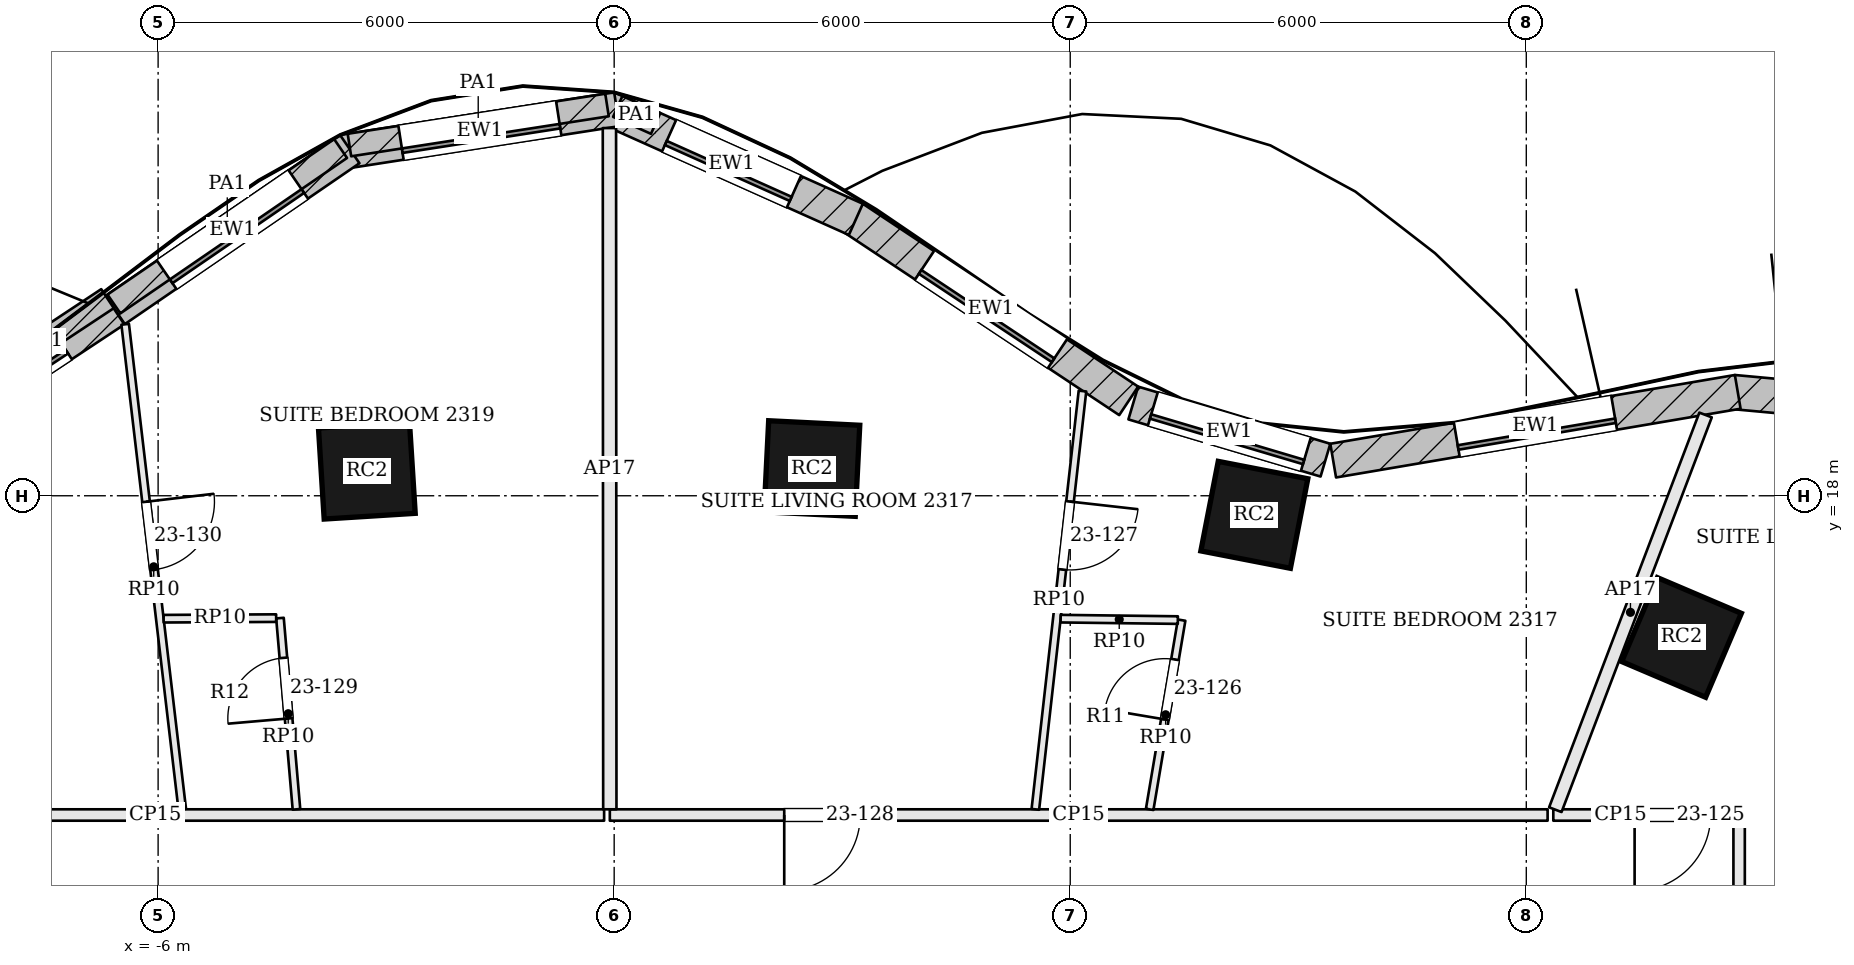
"""IFC4 building model, lengths in metres.
Left out: names, types, materials, properties, quantities, classifications, styles, units other than length and angle.
Written with IfcOpenShell. Run it as: python <this file> out.ifc"""

import sys

from ifc_helpers import new_model, si_unit, direction, frame, frame_2d, origin, origin_2d, place, context, subcontext, project, spatial, rectangle, extrude, element, fill, save


model = new_model("IFC4")
c1 = context("Model", 3, precision=1e-05, world=origin(), true_north=direction((0.0, 1.0)))
c2 = subcontext(c1, "Body", "Model", "MODEL_VIEW")
j1 = project(units=[si_unit("LENGTHUNIT", "METRE"), si_unit("PLANEANGLEUNIT", "RADIAN")], contexts=[c1])
p1 = place(None, origin())
s1 = spatial("IfcSite", under=j1, at=p1, CompositionType="ELEMENT")
p2 = place(p1, origin())
s2 = spatial("IfcBuilding", under=s1, at=p2, CompositionType="ELEMENT")
p3 = place(p2, frame((0.0, 0.0, 99.6)))
s3 = spatial("IfcBuildingStorey", under=s2, at=p3, CompositionType="ELEMENT", Elevation=99.6)
for number, where, z_axis, x_axis in (
    (1, (14.042, 16.136, 0.0), (0.0, 0.0, 1.0), (-0.92, 0.392, 0.0)),
    (2, (8.422, 17.749, 0.0), (0.0, 0.0, 1.0), (-0.982, 0.191, 0.0)),
    (3, (2.602, 18.358, 0.0), (0.0, 0.0, 1.0), (-0.999, 0.05, 0.0)),
    (4, (-3.254, 18.33, 0.0), (0.0, 0.0, 1.0), (-0.998, -0.063, 0.0)),
):
    element("IfcColumn", number, at=place(p3, frame(where, z_axis=z_axis, x_axis=x_axis)), inside=s3, PredefinedType="COLUMN", context=c2, shape_type="SweptSolid", body=[
        extrude(rectangle(XDim=1.2, YDim=1.2, at=origin_2d()), origin(), (0.0, 0.0, 1.0), 3.6),
    ])
p4 = place(p3, frame((19.159, 18.956, 0.0), z_axis=(0.0, 0.0, 1.0), x_axis=(-0.995777399421, 0.091800712424, 0.0)))
e5 = element("IfcWall", 5, at=p4, inside=s3, PredefinedType="SOLIDWALL", context=c2, shape_type="SweptSolid", body=[
    extrude(rectangle(XDim=4.455, YDim=0.45, at=frame_2d((2.227, 0.0))), origin(), (0.0, 0.0, 1.0), 3.4),
])
p5 = place(p4, frame((1.177, 0.0, 0.9)))
e6 = element("IfcOpeningElement", 6, at=p5, cuts=e5, PredefinedType="OPENING", context=c2, shape_type="SweptSolid", body=[
    extrude(rectangle(XDim=2.1, YDim=2.0, at=frame_2d((1.05, 1.0))), frame((0.0, 0.235, 0.0), z_axis=(0.0, -1.0, 0.0), x_axis=(1.0, 0.0, 0.0)), (0.0, 0.0, 1.0), 0.47),
])
p6 = place(p3, frame((14.782, 19.367, 0.0), z_axis=(0.0, 0.0, 1.0), x_axis=(-0.98585584667, -0.167595493934, 0.0)))
e7 = element("IfcWall", 7, at=p6, inside=s3, PredefinedType="SOLIDWALL", context=c2, shape_type="SweptSolid", body=[
    extrude(rectangle(XDim=5.399, YDim=0.45, at=frame_2d((2.699, 0.0))), origin(), (0.0, 0.0, 1.0), 3.4),
])
p7 = place(p6, frame((1.649, 0.0, 0.9)))
e8 = element("IfcOpeningElement", 8, at=p7, cuts=e7, PredefinedType="OPENING", context=c2, shape_type="SweptSolid", body=[
    extrude(rectangle(XDim=2.1, YDim=2.0, at=frame_2d((1.05, 1.0))), frame((0.0, 0.235, 0.0), z_axis=(0.0, -1.0, 0.0), x_axis=(1.0, 0.0, 0.0)), (0.0, 0.0, 1.0), 0.47),
])
p8 = place(p3, frame((9.357, 18.469, 0.0), z_axis=(0.0, 0.0, 1.0), x_axis=(-0.958524054629, 0.285011643091, 0.0)))
e9 = element("IfcWall", 9, at=p8, inside=s3, PredefinedType="SOLIDWALL", context=c2, shape_type="SweptSolid", body=[
    extrude(rectangle(XDim=2.637, YDim=0.45, at=frame_2d((1.319, 0.0))), origin(), (0.0, 0.0, 1.0), 3.4),
])
p9 = place(p8, frame((0.269, 0.0, 0.9)))
e10 = element("IfcOpeningElement", 10, at=p9, cuts=e9, PredefinedType="OPENING", context=c2, shape_type="SweptSolid", body=[
    extrude(rectangle(XDim=2.1, YDim=2.0, at=frame_2d((1.05, 1.0))), frame((0.0, 0.235, 0.0), z_axis=(0.0, -1.0, 0.0), x_axis=(1.0, 0.0, 0.0)), (0.0, 0.0, 1.0), 0.47),
])
p10 = place(p3, frame((6.769, 19.248, 0.0), z_axis=(0.0, 0.0, 1.0), x_axis=(-0.832973379274, 0.553313066375, 0.0)))
e11 = element("IfcWall", 11, at=p10, inside=s3, PredefinedType="SOLIDWALL", context=c2, shape_type="SweptSolid", body=[
    extrude(rectangle(XDim=4.348, YDim=0.45, at=frame_2d((2.174, 0.0))), origin(), (0.0, 0.0, 1.0), 3.4),
])
p11 = place(p10, frame((1.124, 0.0, 0.9)))
e12 = element("IfcOpeningElement", 12, at=p11, cuts=e11, PredefinedType="OPENING", context=c2, shape_type="SweptSolid", body=[
    extrude(rectangle(XDim=2.1, YDim=2.0, at=frame_2d((1.05, 1.0))), frame((0.0, 0.235, 0.0), z_axis=(0.0, -1.0, 0.0), x_axis=(1.0, 0.0, 0.0)), (0.0, 0.0, 1.0), 0.47),
])
p12 = place(p3, frame((3.179, 21.636, 0.0), z_axis=(0.0, 0.0, 1.0), x_axis=(-0.912608353595, 0.40883492139, 0.0)))
e13 = element("IfcWall", 13, at=p12, inside=s3, PredefinedType="SOLIDWALL", context=c2, shape_type="SweptSolid", body=[
    extrude(rectangle(XDim=3.585, YDim=0.45, at=frame_2d((1.792, 0.0))), origin(), (0.0, 0.0, 1.0), 3.4),
])
p13 = place(p12, frame((0.892, 0.0, 0.9)))
e14 = element("IfcOpeningElement", 14, at=p13, cuts=e13, PredefinedType="OPENING", context=c2, shape_type="SweptSolid", body=[
    extrude(rectangle(XDim=1.8, YDim=2.0, at=frame_2d((0.9, 1.0))), frame((0.0, 0.235, 0.0), z_axis=(0.0, -1.0, 0.0), x_axis=(1.0, 0.0, 0.0)), (0.0, 0.0, 1.0), 0.47),
])
p14 = place(p3, frame((0.035, 23.085, 0.0), z_axis=(0.0, 0.0, 1.0), x_axis=(-0.988133637562, -0.153596596054, 0.0)))
e15 = element("IfcWall", 15, at=p14, inside=s3, PredefinedType="SOLIDWALL", context=c2, shape_type="SweptSolid", body=[
    extrude(rectangle(XDim=3.646, YDim=0.45, at=frame_2d((1.823, 0.0))), origin(), (0.0, 0.0, 1.0), 3.4),
])
p15 = place(p14, frame((0.773, 0.0, 0.9)))
e16 = element("IfcOpeningElement", 16, at=p15, cuts=e15, PredefinedType="OPENING", context=c2, shape_type="SweptSolid", body=[
    extrude(rectangle(XDim=2.1, YDim=2.0, at=frame_2d((1.05, 1.0))), frame((0.0, 0.235, 0.0), z_axis=(0.0, -1.0, 0.0), x_axis=(1.0, 0.0, 0.0)), (0.0, 0.0, 1.0), 0.47),
])
p16 = place(p3, frame((-3.479, 22.56, 0.0), z_axis=(0.0, 0.0, 1.0), x_axis=(-0.824722766417, -0.565537230033, 0.0)))
e17 = element("IfcWall", 17, at=p16, inside=s3, PredefinedType="SOLIDWALL", context=c2, shape_type="SweptSolid", body=[
    extrude(rectangle(XDim=3.742, YDim=0.45, at=frame_2d((1.871, 0.0))), origin(), (0.0, 0.0, 1.0), 3.4),
])
p17 = place(p16, frame((0.821, 0.0, 0.9)))
e18 = element("IfcOpeningElement", 18, at=p17, cuts=e17, PredefinedType="OPENING", context=c2, shape_type="SweptSolid", body=[
    extrude(rectangle(XDim=2.1, YDim=2.0, at=frame_2d((1.05, 1.0))), frame((0.0, 0.235, 0.0), z_axis=(0.0, -1.0, 0.0), x_axis=(1.0, 0.0, 0.0)), (0.0, 0.0, 1.0), 0.47),
])
p18 = place(p3, frame((-6.568, 20.441, 0.0), z_axis=(0.0, 0.0, 1.0), x_axis=(-0.834034214531, -0.551712723246, 0.0)))
e19 = element("IfcWall", 19, at=p18, inside=s3, PredefinedType="SOLIDWALL", context=c2, shape_type="SweptSolid", body=[
    extrude(rectangle(XDim=3.757, YDim=0.45, at=frame_2d((1.879, 0.0))), origin(), (0.0, 0.0, 1.0), 3.4),
])
p19 = place(p18, frame((0.829, 0.0, 0.9)))
e20 = element("IfcOpeningElement", 20, at=p19, cuts=e19, PredefinedType="OPENING", context=c2, shape_type="SweptSolid", body=[
    extrude(rectangle(XDim=2.1, YDim=2.0, at=frame_2d((1.05, 1.0))), frame((0.0, 0.235, 0.0), z_axis=(0.0, -1.0, 0.0), x_axis=(1.0, 0.0, 0.0)), (0.0, 0.0, 1.0), 0.47),
])
p20 = place(p3, frame((0.545, 22.898, 3.6), z_axis=(0.0, 0.0, 1.0), x_axis=(-0.912497815069, 0.409081578044, 0.0)))
e21 = element("IfcWall", 21, at=p20, inside=s3, PredefinedType="PARAPET", context=c2, shape_type="SweptSolid", body=[
    extrude(rectangle(XDim=0.546, YDim=0.3, at=frame_2d((0.273, 0.0))), origin(), (0.0, 0.0, 1.0), 1.1),
])
p21 = place(p3, frame((-0.094, 23.14, 3.6), z_axis=(0.0, 0.0, 1.0), x_axis=(-0.988150084887, -0.153490748056, 0.0)))
e22 = element("IfcWall", 22, at=p21, inside=s3, PredefinedType="PARAPET", context=c2, shape_type="SweptSolid", body=[
    extrude(rectangle(XDim=3.429, YDim=0.3, at=frame_2d((1.715, 0.0))), origin(), (0.0, 0.0, 1.0), 1.1),
])
p22 = place(p3, frame((-3.599, 22.568, 3.6), z_axis=(0.0, 0.0, 1.0), x_axis=(-0.82476034254, -0.565482428881, 0.0)))
e23 = element("IfcWall", 23, at=p22, inside=s3, PredefinedType="PARAPET", context=c2, shape_type="SweptSolid", body=[
    extrude(rectangle(XDim=3.616, YDim=0.3, at=frame_2d((1.808, 0.0))), origin(), (0.0, 0.0, 1.0), 1.1),
])
p23 = place(p3, frame((-6.665, 20.593, 3.6), z_axis=(0.0, 0.0, 1.0), x_axis=(-0.834027642059, -0.551722658843, 0.0)))
e24 = element("IfcWall", 24, at=p23, inside=s3, PredefinedType="PARAPET", context=c2, shape_type="SweptSolid", body=[
    extrude(rectangle(XDim=2.008, YDim=0.3, at=frame_2d((1.004, 0.0))), origin(), (0.0, 0.0, 1.0), 1.1),
])
p24 = place(p3, frame((14.8, 10.572, 0.0), z_axis=(0.0, 0.0, 1.0), x_axis=(0.0, 1.0, 0.0)))
e25 = element("IfcWall", 25, at=p24, inside=s3, PredefinedType="PARTITIONING", context=c2, shape_type="SweptSolid", body=[
    extrude(rectangle(XDim=3.228, YDim=0.15, at=frame_2d((1.614, 0.0))), origin(), (0.0, 0.0, 1.0), 2.784),
])
p25 = place(p3, frame((14.725, 13.8, 0.0), z_axis=(0.0, 0.0, 1.0), x_axis=(-1.0, 0.0, 0.0)))
e26 = element("IfcWall", 26, at=p25, inside=s3, PredefinedType="PARTITIONING", context=c2, shape_type="SweptSolid", body=[
    extrude(rectangle(XDim=2.37, YDim=0.15, at=frame_2d((1.185, 0.0))), origin(), (0.0, 0.0, 1.0), 2.784),
])
p26 = place(p25, frame((0.3, 0.0, 0.0)))
e27 = element("IfcOpeningElement", 27, at=p26, cuts=e26, PredefinedType="OPENING", context=c2, shape_type="SweptSolid", body=[
    extrude(rectangle(XDim=1.0, YDim=2.1, at=frame_2d((0.5, 1.05))), frame((0.0, 0.085, 0.0), z_axis=(0.0, -1.0, 0.0), x_axis=(1.0, 0.0, 0.0)), (0.0, 0.0, 1.0), 0.17),
])
p27 = place(p3, frame((14.359, 19.063, 0.0), z_axis=(0.0, 0.0, 1.0), x_axis=(-0.355746808742, -0.934582370939, 0.0)))
e28 = element("IfcWall", 28, at=p27, inside=s3, PredefinedType="PARTITIONING", context=c2, shape_type="SweptSolid", body=[
    extrude(rectangle(XDim=5.556, YDim=0.175, at=frame_2d((2.778, 0.0))), origin(), (0.0, 0.0, 1.0), 2.784),
])
p28 = place(p3, frame((12.281, 13.8, 0.0), z_axis=(0.0, 0.0, 1.0), x_axis=(-1.0, 0.0, 0.0)))
e29 = element("IfcWall", 29, at=p28, inside=s3, PredefinedType="PARTITIONING", context=c2, shape_type="SweptSolid", body=[
    extrude(rectangle(XDim=12.338, YDim=0.15, at=frame_2d((6.169, 0.0))), origin(), (0.0, 0.0, 1.0), 2.784),
])
p29 = place(p28, frame((9.043, 0.0, 0.0)))
e30 = element("IfcOpeningElement", 30, at=p29, cuts=e29, PredefinedType="OPENING", context=c2, shape_type="SweptSolid", body=[
    extrude(rectangle(XDim=1.0, YDim=2.1, at=frame_2d((0.5, 1.05))), frame((0.0, 0.085, 0.0), z_axis=(0.0, -1.0, 0.0), x_axis=(1.0, 0.0, 0.0)), (0.0, 0.0, 1.0), 0.17),
])
p30 = place(p3, frame((-0.062, 22.837, 0.0), z_axis=(0.0, 0.0, 1.0), x_axis=(0.000599291639, -0.999999820425, 0.0)))
e31 = element("IfcWall", 31, at=p30, inside=s3, PredefinedType="PARTITIONING", context=c2, shape_type="SweptSolid", body=[
    extrude(rectangle(XDim=8.962, YDim=0.175, at=frame_2d((4.481, 0.0))), origin(), (0.0, 0.0, 1.0), 2.784),
])
p31 = place(p3, frame((-0.132, 13.8, 0.0), z_axis=(0.0, 0.0, 1.0), x_axis=(-1.0, 0.0, 0.0)))
e32 = element("IfcWall", 32, at=p31, inside=s3, PredefinedType="PARTITIONING", context=c2, shape_type="SweptSolid", body=[
    extrude(rectangle(XDim=11.81, YDim=0.15, at=frame_2d((5.905, 0.0))), origin(), (0.0, 0.0, 1.0), 2.784),
])
p32 = place(p31, frame((8.213, 0.0, 0.0)))
e33 = element("IfcOpeningElement", 33, at=p32, cuts=e32, PredefinedType="OPENING", context=c2, shape_type="SweptSolid", body=[
    extrude(rectangle(XDim=1.0, YDim=2.1, at=frame_2d((0.5, 1.05))), frame((0.0, 0.085, 0.0), z_axis=(0.0, -1.0, 0.0), x_axis=(1.0, 0.0, 0.0)), (0.0, 0.0, 1.0), 0.17),
])
p33 = place(p3, frame((18.949, 18.745, 0.0), z_axis=(0.0, 0.0, 1.0), x_axis=(-0.505754187447, -0.862677634972, 0.0)))
e34 = element("IfcWall", 34, at=p33, inside=s3, PredefinedType="PARTITIONING", context=c2, shape_type="SweptSolid", body=[
    extrude(rectangle(XDim=8.128, YDim=0.1, at=frame_2d((4.064, 0.0))), origin(), (0.0, 0.0, 1.0), 2.784),
])
p34 = place(p33, frame((4.053, 0.0, 0.0)))
e35 = element("IfcOpeningElement", 35, at=p34, cuts=e34, PredefinedType="OPENING", context=c2, shape_type="SweptSolid", body=[
    extrude(rectangle(XDim=0.9, YDim=2.4, at=frame_2d((0.45, 1.2))), frame((0.0, 0.06, 0.0), z_axis=(0.0, -1.0, 0.0), x_axis=(1.0, 0.0, 0.0)), (0.0, 0.0, 1.0), 0.12),
])
p35 = place(p3, frame((6.161, 19.377, 0.0), z_axis=(0.0, 0.0, 1.0), x_axis=(-0.11193626313, -0.993715388326, 0.0)))
e36 = element("IfcWall", 36, at=p35, inside=s3, PredefinedType="PARTITIONING", context=c2, shape_type="SweptSolid", body=[
    extrude(rectangle(XDim=5.538, YDim=0.1, at=frame_2d((2.769, 0.0))), origin(), (0.0, 0.0, 1.0), 2.784),
])
p36 = place(p35, frame((1.463, 0.0, 0.0)))
e37 = element("IfcOpeningElement", 37, at=p36, cuts=e36, PredefinedType="OPENING", context=c2, shape_type="SweptSolid", body=[
    extrude(rectangle(XDim=0.9, YDim=2.4, at=frame_2d((0.45, 1.2))), frame((0.0, 0.06, 0.0), z_axis=(0.0, -1.0, 0.0), x_axis=(1.0, 0.0, 0.0)), (0.0, 0.0, 1.0), 0.12),
])
p37 = place(p3, frame((7.045, 13.874, 0.0), z_axis=(0.0, 0.0, 1.0), x_axis=(0.166499655313, 0.986041512707, 0.0)))
e38 = element("IfcWall", 38, at=p37, inside=s3, PredefinedType="PARTITIONING", context=c2, shape_type="SweptSolid", body=[
    extrude(rectangle(XDim=2.525, YDim=0.1, at=frame_2d((1.262, 0.0))), origin(), (0.0, 0.0, 1.0), 2.784),
])
p38 = place(p37, frame((1.2, 0.0, 0.0)))
e39 = element("IfcOpeningElement", 39, at=p38, cuts=e38, PredefinedType="OPENING", context=c2, shape_type="SweptSolid", body=[
    extrude(rectangle(XDim=0.8, YDim=2.1, at=frame_2d((0.4, 1.05))), frame((0.0, 0.06, 0.0), z_axis=(0.0, -1.0, 0.0), x_axis=(1.0, 0.0, 0.0)), (0.0, 0.0, 1.0), 0.12),
])
p39 = place(p3, frame((7.416, 16.364, 0.0), z_axis=(0.0, 0.0, 1.0), x_axis=(-0.999925671337, 0.012192284512, 0.0)))
e40 = element("IfcWall", 40, at=p39, inside=s3, PredefinedType="PARTITIONING", context=c2, shape_type="SweptSolid", body=[
    extrude(rectangle(XDim=1.542, YDim=0.1, at=frame_2d((0.771, 0.0))), origin(), (0.0, 0.0, 1.0), 2.784),
])
p40 = place(p3, frame((-6.433, 20.256, 0.0), z_axis=(0.0, 0.0, 1.0), x_axis=(0.116872110209, -0.993146972938, 0.0)))
e41 = element("IfcWall", 41, at=p40, inside=s3, PredefinedType="PARTITIONING", context=c2, shape_type="SweptSolid", body=[
    extrude(rectangle(XDim=6.426, YDim=0.1, at=frame_2d((3.213, 0.0))), origin(), (0.0, 0.0, 1.0), 2.784),
])
p41 = place(p40, frame((2.351, 0.0, 0.0)))
e42 = element("IfcOpeningElement", 42, at=p41, cuts=e41, PredefinedType="OPENING", context=c2, shape_type="SweptSolid", body=[
    extrude(rectangle(XDim=0.9, YDim=2.4, at=frame_2d((0.45, 1.2))), frame((0.0, 0.06, 0.0), z_axis=(0.0, -1.0, 0.0), x_axis=(1.0, 0.0, 0.0)), (0.0, 0.0, 1.0), 0.12),
])
p42 = place(p3, frame((-4.18, 13.875, 0.0), z_axis=(0.0, 0.0, 1.0), x_axis=(-0.085957842689, 0.996298775107, 0.0)))
e43 = element("IfcWall", 43, at=p42, inside=s3, PredefinedType="PARTITIONING", context=c2, shape_type="SweptSolid", body=[
    extrude(rectangle(XDim=2.525, YDim=0.1, at=frame_2d((1.262, 0.0))), origin(), (0.0, 0.0, 1.0), 2.784),
])
p43 = place(p42, frame((1.2, 0.0, 0.0)))
e44 = element("IfcOpeningElement", 44, at=p43, cuts=e43, PredefinedType="OPENING", context=c2, shape_type="SweptSolid", body=[
    extrude(rectangle(XDim=0.8, YDim=2.1, at=frame_2d((0.4, 1.05))), frame((0.0, 0.06, 0.0), z_axis=(0.0, -1.0, 0.0), x_axis=(1.0, 0.0, 0.0)), (0.0, 0.0, 1.0), 0.12),
])
p44 = place(p3, frame((-4.447, 16.39, 0.0), z_axis=(0.0, 0.0, 1.0), x_axis=(-0.999986933283, -0.005112070404, 0.0)))
e45 = element("IfcWall", 45, at=p44, inside=s3, PredefinedType="PARTITIONING", context=c2, shape_type="SweptSolid", body=[
    extrude(rectangle(XDim=1.48, YDim=0.1, at=frame_2d((0.74, 0.0))), origin(), (0.0, 0.0, 1.0), 2.784),
])
p45 = place(p7, origin())
e46 = element("IfcWindow", 46, at=p45, inside=s3, PartitioningType="SINGLE_PANEL", PredefinedType="WINDOW", context=c2, shape_type="SweptSolid", body=[
    extrude(rectangle(XDim=2.1, YDim=2.0, at=frame_2d((1.05, 1.0))), frame((0.0, 0.135, 0.0), z_axis=(0.0, -1.0, 0.0), x_axis=(1.0, 0.0, 0.0)), (0.0, 0.0, 1.0), 0.06),
])
fill(e8, e46)
p46 = place(p9, origin())
e47 = element("IfcWindow", 47, at=p46, inside=s3, PartitioningType="SINGLE_PANEL", PredefinedType="WINDOW", context=c2, shape_type="SweptSolid", body=[
    extrude(rectangle(XDim=2.1, YDim=2.0, at=frame_2d((1.05, 1.0))), frame((0.0, 0.135, 0.0), z_axis=(0.0, -1.0, 0.0), x_axis=(1.0, 0.0, 0.0)), (0.0, 0.0, 1.0), 0.06),
])
fill(e10, e47)
p47 = place(p11, origin())
e48 = element("IfcWindow", 48, at=p47, inside=s3, PartitioningType="SINGLE_PANEL", PredefinedType="WINDOW", context=c2, shape_type="SweptSolid", body=[
    extrude(rectangle(XDim=2.1, YDim=2.0, at=frame_2d((1.05, 1.0))), frame((0.0, 0.135, 0.0), z_axis=(0.0, -1.0, 0.0), x_axis=(1.0, 0.0, 0.0)), (0.0, 0.0, 1.0), 0.06),
])
fill(e12, e48)
p48 = place(p13, origin())
e49 = element("IfcWindow", 49, at=p48, inside=s3, PartitioningType="SINGLE_PANEL", PredefinedType="WINDOW", context=c2, shape_type="SweptSolid", body=[
    extrude(rectangle(XDim=1.8, YDim=2.0, at=frame_2d((0.9, 1.0))), frame((0.0, 0.135, 0.0), z_axis=(0.0, -1.0, 0.0), x_axis=(1.0, 0.0, 0.0)), (0.0, 0.0, 1.0), 0.06),
])
fill(e14, e49)
p49 = place(p15, origin())
e50 = element("IfcWindow", 50, at=p49, inside=s3, PartitioningType="SINGLE_PANEL", PredefinedType="WINDOW", context=c2, shape_type="SweptSolid", body=[
    extrude(rectangle(XDim=2.1, YDim=2.0, at=frame_2d((1.05, 1.0))), frame((0.0, 0.135, 0.0), z_axis=(0.0, -1.0, 0.0), x_axis=(1.0, 0.0, 0.0)), (0.0, 0.0, 1.0), 0.06),
])
fill(e16, e50)
p50 = place(p17, origin())
e51 = element("IfcWindow", 51, at=p50, inside=s3, PartitioningType="SINGLE_PANEL", PredefinedType="WINDOW", context=c2, shape_type="SweptSolid", body=[
    extrude(rectangle(XDim=2.1, YDim=2.0, at=frame_2d((1.05, 1.0))), frame((0.0, 0.135, 0.0), z_axis=(0.0, -1.0, 0.0), x_axis=(1.0, 0.0, 0.0)), (0.0, 0.0, 1.0), 0.06),
])
fill(e18, e51)
p51 = place(p19, origin())
e52 = element("IfcWindow", 52, at=p51, inside=s3, PartitioningType="SINGLE_PANEL", PredefinedType="WINDOW", context=c2, shape_type="SweptSolid", body=[
    extrude(rectangle(XDim=2.1, YDim=2.0, at=frame_2d((1.05, 1.0))), frame((0.0, 0.135, 0.0), z_axis=(0.0, -1.0, 0.0), x_axis=(1.0, 0.0, 0.0)), (0.0, 0.0, 1.0), 0.06),
])
fill(e20, e52)
p52 = place(p26, origin())
e53 = element("IfcDoor", 53, at=p52, inside=s3, OperationType="SINGLE_SWING_RIGHT", PredefinedType="DOOR", context=c2, shape_type="SweptSolid", body=[
    extrude(rectangle(XDim=1.0, YDim=2.1, at=frame_2d((0.5, 1.05))), frame((0.0, 0.025, 0.0), z_axis=(0.0, -1.0, 0.0), x_axis=(1.0, 0.0, 0.0)), (0.0, 0.0, 1.0), 0.05),
])
fill(e27, e53)
p53 = place(p38, origin())
e54 = element("IfcDoor", 54, at=p53, inside=s3, OperationType="SINGLE_SWING_LEFT", PredefinedType="DOOR", context=c2, shape_type="SweptSolid", body=[
    extrude(rectangle(XDim=0.8, YDim=2.1, at=frame_2d((0.4, 1.05))), frame((0.0, 0.025, 0.0), z_axis=(0.0, -1.0, 0.0), x_axis=(1.0, 0.0, 0.0)), (0.0, 0.0, 1.0), 0.05),
])
fill(e39, e54)
p54 = place(p36, origin())
e55 = element("IfcDoor", 55, at=p54, inside=s3, OperationType="SINGLE_SWING_LEFT", PredefinedType="DOOR", context=c2, shape_type="SweptSolid", body=[
    extrude(rectangle(XDim=0.9, YDim=2.4, at=frame_2d((0.45, 1.2))), frame((0.0, 0.025, 0.0), z_axis=(0.0, -1.0, 0.0), x_axis=(1.0, 0.0, 0.0)), (0.0, 0.0, 1.0), 0.05),
])
fill(e37, e55)
p55 = place(p29, origin())
e56 = element("IfcDoor", 56, at=p55, inside=s3, OperationType="SINGLE_SWING_RIGHT", PredefinedType="DOOR", context=c2, shape_type="SweptSolid", body=[
    extrude(rectangle(XDim=1.0, YDim=2.1, at=frame_2d((0.5, 1.05))), frame((0.0, 0.025, 0.0), z_axis=(0.0, -1.0, 0.0), x_axis=(1.0, 0.0, 0.0)), (0.0, 0.0, 1.0), 0.05),
])
fill(e30, e56)
p56 = place(p43, origin())
e57 = element("IfcDoor", 57, at=p56, inside=s3, OperationType="SINGLE_SWING_LEFT", PredefinedType="DOOR", context=c2, shape_type="SweptSolid", body=[
    extrude(rectangle(XDim=0.8, YDim=2.1, at=frame_2d((0.4, 1.05))), frame((0.0, 0.025, 0.0), z_axis=(0.0, -1.0, 0.0), x_axis=(1.0, 0.0, 0.0)), (0.0, 0.0, 1.0), 0.05),
])
fill(e44, e57)
p57 = place(p41, origin())
e58 = element("IfcDoor", 58, at=p57, inside=s3, OperationType="SINGLE_SWING_LEFT", PredefinedType="DOOR", context=c2, shape_type="SweptSolid", body=[
    extrude(rectangle(XDim=0.9, YDim=2.4, at=frame_2d((0.45, 1.2))), frame((0.0, 0.025, 0.0), z_axis=(0.0, -1.0, 0.0), x_axis=(1.0, 0.0, 0.0)), (0.0, 0.0, 1.0), 0.05),
])
fill(e42, e58)
save(model, sys.argv[1])
